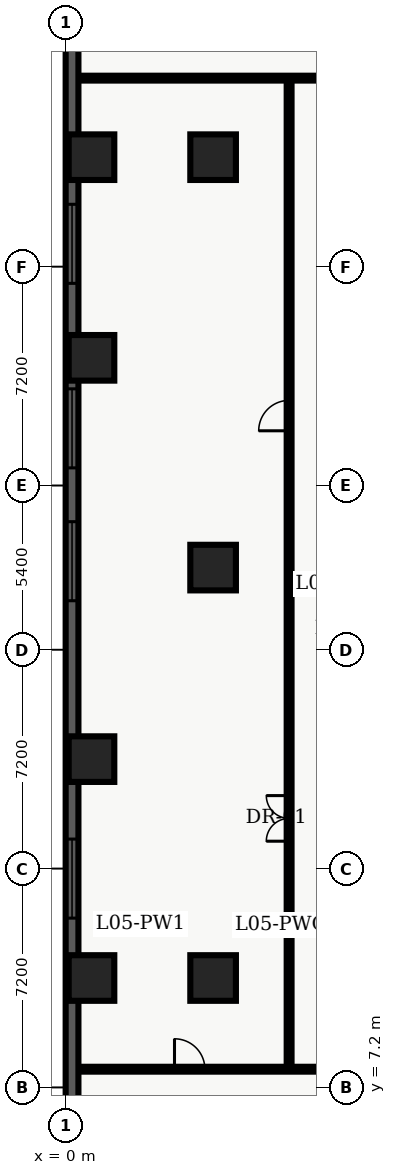
"""IFC4 building model, lengths in metres.
Left out: names, types, materials, properties, quantities, classifications, styles, units other than length and angle.
Written with IfcOpenShell. Run it as: python <this file> out.ifc"""

import sys

from ifc_helpers import new_model, entity, si_unit, converted_unit, direction, frame, origin_with_axes, origin_2d_with_axis, place, context, subcontext, project, spatial, polyline, rectangle, outline, extrude, element, fill, save


model = new_model("IFC4")
c1 = context("Model", 3, precision=1e-05, world=origin_with_axes(), true_north=direction((0.0, 1.0)))
c2 = subcontext(c1, "Body", "Model", "MODEL_VIEW")
j1 = project(units=[si_unit("LENGTHUNIT", "METRE"), converted_unit("PLANEANGLEUNIT", "DEGREE", entity("IfcPlaneAngleMeasure", 0.017), si_unit("PLANEANGLEUNIT", "RADIAN"), dimensions=[0, 0, 0, 0, 0, 0, 0])], contexts=[c1])
p1 = place(None, origin_with_axes())
s1 = spatial("IfcSite", under=j1, at=p1, CompositionType="ELEMENT")
p2 = place(p1, origin_with_axes())
s2 = spatial("IfcBuilding", under=s1, at=p2, CompositionType="ELEMENT")
p3 = place(p2, frame((0.0, 0.0, 24.3), z_axis=(0.0, 0.0, 1.0), x_axis=(1.0, 0.0, 0.0)))
s3 = spatial("IfcBuildingStorey", under=s2, at=p3, CompositionType="ELEMENT", Elevation=24.3)
for number, where, z_axis, x_axis in (
    (1, (4.85, 10.8, 0.0), (0.0, 0.0, 1.0), (1.0, 0.0, 0.0)),
    (2, (4.85, 24.3, 0.0), (0.0, 0.0, 1.0), (1.0, 0.0, 0.0)),
    (3, (4.85, 37.8, 0.0), (0.0, 0.0, 1.0), (1.0, 0.0, 0.0)),
    (4, (0.85, 10.8, 0.0), (0.0, 0.0, 1.0), (1.0, 0.0, 0.0)),
    (5, (0.85, 18.0, 0.0), (0.0, 0.0, 1.0), (1.0, 0.0, 0.0)),
    (6, (0.85, 31.2, 0.0), (0.0, 0.0, 1.0), (1.0, 0.0, 0.0)),
    (7, (0.85, 37.8, 0.0), (0.0, 0.0, 1.0), (1.0, 0.0, 0.0)),
):
    element("IfcColumn", number, at=place(p3, frame(where, z_axis=z_axis, x_axis=x_axis)), inside=s3, PredefinedType="COLUMN", context=c2, shape_type="SweptSolid", body=[
        extrude(rectangle(XDim=1.5, YDim=1.5, at=origin_2d_with_axis()), origin_with_axes(), (0.0, 0.0, 1.0), 4.5),
    ])
p4 = place(p3, frame((0.38, 7.8, 0.0), z_axis=(0.0, 0.0, 1.0), x_axis=(1.0, 0.0, 0.0)))
e8 = element("IfcWall", 8, at=p4, inside=s3, PredefinedType="PARTITIONING", context=c2, shape_type="SweptSolid", body=[
    extrude(outline(polyline([(0.0, -0.08), (20.92, -0.08), (20.92, 0.08), (0.0, 0.08), (0.0, -0.08)])), origin_with_axes(), (0.0, 0.0, 1.0), 3.2),
])
p5 = place(p4, frame((3.7, 0.0, 0.0), z_axis=(0.0, 0.0, 1.0), x_axis=(1.0, 0.0, 0.0)))
e9 = element("IfcOpeningElement", 9, at=p5, cuts=e8, PredefinedType="OPENING", context=c2, shape_type="SweptSolid", body=[
    extrude(rectangle(XDim=1.0, YDim=0.18, at=origin_2d_with_axis()), origin_with_axes(), (0.0, 0.0, 1.0), 2.15),
])
p6 = place(p4, frame((15.3, 0.0, 0.0), z_axis=(0.0, 0.0, 1.0), x_axis=(1.0, 0.0, 0.0)))
e10 = element("IfcOpeningElement", 10, at=p6, cuts=e8, PredefinedType="OPENING", context=c2, shape_type="SweptSolid", body=[
    extrude(rectangle(XDim=1.0, YDim=0.18, at=origin_2d_with_axis()), origin_with_axes(), (0.0, 0.0, 1.0), 2.15),
])
p7 = place(p3, frame((0.38, 40.4, 0.0), z_axis=(0.0, 0.0, 1.0), x_axis=(1.0, 0.0, 0.0)))
e11 = element("IfcWall", 11, at=p7, inside=s3, PredefinedType="PARTITIONING", context=c2, shape_type="SweptSolid", body=[
    extrude(outline(polyline([(0.0, -0.08), (20.92, -0.08), (20.92, 0.08), (0.0, 0.08), (0.0, -0.08)])), origin_with_axes(), (0.0, 0.0, 1.0), 3.2),
])
p8 = place(p7, frame((15.25, 0.0, 0.0), z_axis=(0.0, 0.0, 1.0), x_axis=(1.0, 0.0, 0.0)))
e12 = element("IfcOpeningElement", 12, at=p8, cuts=e11, PredefinedType="OPENING", context=c2, shape_type="SweptSolid", body=[
    extrude(rectangle(XDim=1.5, YDim=0.18, at=origin_2d_with_axis()), origin_with_axes(), (0.0, 0.0, 1.0), 2.2),
])
p9 = place(p3, frame((7.35, 7.8, 0.0), z_axis=(0.0, 0.0, 1.0), x_axis=(0.0, 1.0, 0.0)))
e13 = element("IfcWall", 13, at=p9, inside=s3, PredefinedType="PARTITIONING", context=c2, shape_type="SweptSolid", body=[
    extrude(outline(polyline([(0.0, -0.08), (32.6, -0.08), (32.6, 0.08), (0.0, 0.08), (0.0, -0.08)])), origin_with_axes(), (0.0, 0.0, 1.0), 3.2),
])
p10 = place(p9, frame((8.25, 0.0, 0.0), z_axis=(0.0, 0.0, 1.0), x_axis=(1.0, 0.0, 0.0)))
e14 = element("IfcOpeningElement", 14, at=p10, cuts=e13, PredefinedType="OPENING", context=c2, shape_type="SweptSolid", body=[
    extrude(rectangle(XDim=1.5, YDim=0.18, at=origin_2d_with_axis()), origin_with_axes(), (0.0, 0.0, 1.0), 2.2),
])
p11 = place(p9, frame((21.5, 0.0, 0.0), z_axis=(0.0, 0.0, 1.0), x_axis=(1.0, 0.0, 0.0)))
e15 = element("IfcOpeningElement", 15, at=p11, cuts=e13, PredefinedType="OPENING", context=c2, shape_type="SweptSolid", body=[
    extrude(rectangle(XDim=1.0, YDim=0.18, at=origin_2d_with_axis()), origin_with_axes(), (0.0, 0.0, 1.0), 2.15),
])
p12 = place(p3, frame((0.21, 0.42, 0.0), z_axis=(0.0, 0.0, 1.0), x_axis=(0.0, 1.0, 0.0)))
e16 = element("IfcWall", 16, at=p12, inside=s3, PredefinedType="SOLIDWALL", context=c2, shape_type="SweptSolid", body=[
    extrude(outline(polyline([(0.0, -0.21), (48.18, -0.21), (48.18, 0.21), (0.0, 0.21), (0.0, -0.21)])), origin_with_axes(), (0.0, 0.0, 1.0), 4.2),
])
p13 = place(p12, frame((13.65, 0.0, 0.45), z_axis=(0.0, 0.0, 1.0), x_axis=(1.0, 0.0, 0.0)))
e17 = element("IfcOpeningElement", 17, at=p13, cuts=e16, PredefinedType="OPENING", context=c2, shape_type="SweptSolid", body=[
    extrude(rectangle(XDim=2.6, YDim=0.44, at=origin_2d_with_axis()), origin_with_axes(), (0.0, 0.0, 1.0), 2.8),
])
p14 = place(p12, frame((24.09, 0.0, 0.45), z_axis=(0.0, 0.0, 1.0), x_axis=(1.0, 0.0, 0.0)))
e18 = element("IfcOpeningElement", 18, at=p14, cuts=e16, PredefinedType="OPENING", context=c2, shape_type="SweptSolid", body=[
    extrude(rectangle(XDim=2.6, YDim=0.44, at=origin_2d_with_axis()), origin_with_axes(), (0.0, 0.0, 1.0), 2.8),
])
p15 = place(p12, frame((28.46, 0.0, 0.45), z_axis=(0.0, 0.0, 1.0), x_axis=(1.0, 0.0, 0.0)))
e19 = element("IfcOpeningElement", 19, at=p15, cuts=e16, PredefinedType="OPENING", context=c2, shape_type="SweptSolid", body=[
    extrude(rectangle(XDim=2.6, YDim=0.44, at=origin_2d_with_axis()), origin_with_axes(), (0.0, 0.0, 1.0), 2.8),
])
p16 = place(p12, frame((34.53, 0.0, 0.45), z_axis=(0.0, 0.0, 1.0), x_axis=(1.0, 0.0, 0.0)))
e20 = element("IfcOpeningElement", 20, at=p16, cuts=e16, PredefinedType="OPENING", context=c2, shape_type="SweptSolid", body=[
    extrude(rectangle(XDim=2.6, YDim=0.44, at=origin_2d_with_axis()), origin_with_axes(), (0.0, 0.0, 1.0), 2.8),
])
p17 = place(p4, frame((3.7, 0.0, 0.0), z_axis=(0.0, 0.0, 1.0), x_axis=(1.0, 0.0, 0.0)))
e21 = element("IfcDoor", 21, at=p17, inside=s3, OperationType="SINGLE_SWING_LEFT", PredefinedType="DOOR", context=c2, shape_type="SweptSolid", body=[
    extrude(rectangle(XDim=1.0, YDim=0.09, at=origin_2d_with_axis()), origin_with_axes(), (0.0, 0.0, 1.0), 2.15),
])
fill(e9, e21)
p18 = place(p9, frame((8.25, 0.0, 0.0), z_axis=(0.0, 0.0, 1.0), x_axis=(1.0, 0.0, 0.0)))
e22 = element("IfcDoor", 22, at=p18, inside=s3, OperationType="DOUBLE_DOOR_SINGLE_SWING", PredefinedType="DOOR", context=c2, shape_type="SweptSolid", body=[
    extrude(rectangle(XDim=1.5, YDim=0.09, at=origin_2d_with_axis()), origin_with_axes(), (0.0, 0.0, 1.0), 2.2),
])
fill(e14, e22)
p19 = place(p9, frame((21.5, 0.0, 0.0), z_axis=(0.0, 0.0, 1.0), x_axis=(1.0, 0.0, 0.0)))
e23 = element("IfcDoor", 23, at=p19, inside=s3, OperationType="SINGLE_SWING_LEFT", PredefinedType="DOOR", context=c2, shape_type="SweptSolid", body=[
    extrude(rectangle(XDim=1.0, YDim=0.09, at=origin_2d_with_axis()), origin_with_axes(), (0.0, 0.0, 1.0), 2.15),
])
fill(e15, e23)
p20 = place(p12, frame((13.65, 0.0, 0.45), z_axis=(0.0, 0.0, 1.0), x_axis=(1.0, 0.0, 0.0)))
e24 = element("IfcWindow", 24, at=p20, inside=s3, PredefinedType="WINDOW", context=c2, shape_type="SweptSolid", body=[
    extrude(rectangle(XDim=2.6, YDim=0.09, at=origin_2d_with_axis()), origin_with_axes(), (0.0, 0.0, 1.0), 2.8),
])
fill(e17, e24)
p21 = place(p12, frame((24.09, 0.0, 0.45), z_axis=(0.0, 0.0, 1.0), x_axis=(1.0, 0.0, 0.0)))
e25 = element("IfcWindow", 25, at=p21, inside=s3, PredefinedType="WINDOW", context=c2, shape_type="SweptSolid", body=[
    extrude(rectangle(XDim=2.6, YDim=0.09, at=origin_2d_with_axis()), origin_with_axes(), (0.0, 0.0, 1.0), 2.8),
])
fill(e18, e25)
p22 = place(p12, frame((28.46, 0.0, 0.45), z_axis=(0.0, 0.0, 1.0), x_axis=(1.0, 0.0, 0.0)))
e26 = element("IfcWindow", 26, at=p22, inside=s3, PredefinedType="WINDOW", context=c2, shape_type="SweptSolid", body=[
    extrude(rectangle(XDim=2.6, YDim=0.09, at=origin_2d_with_axis()), origin_with_axes(), (0.0, 0.0, 1.0), 2.8),
])
fill(e19, e26)
p23 = place(p12, frame((34.53, 0.0, 0.45), z_axis=(0.0, 0.0, 1.0), x_axis=(1.0, 0.0, 0.0)))
e27 = element("IfcWindow", 27, at=p23, inside=s3, PredefinedType="WINDOW", context=c2, shape_type="SweptSolid", body=[
    extrude(rectangle(XDim=2.6, YDim=0.09, at=origin_2d_with_axis()), origin_with_axes(), (0.0, 0.0, 1.0), 2.8),
])
fill(e20, e27)
save(model, sys.argv[1])
